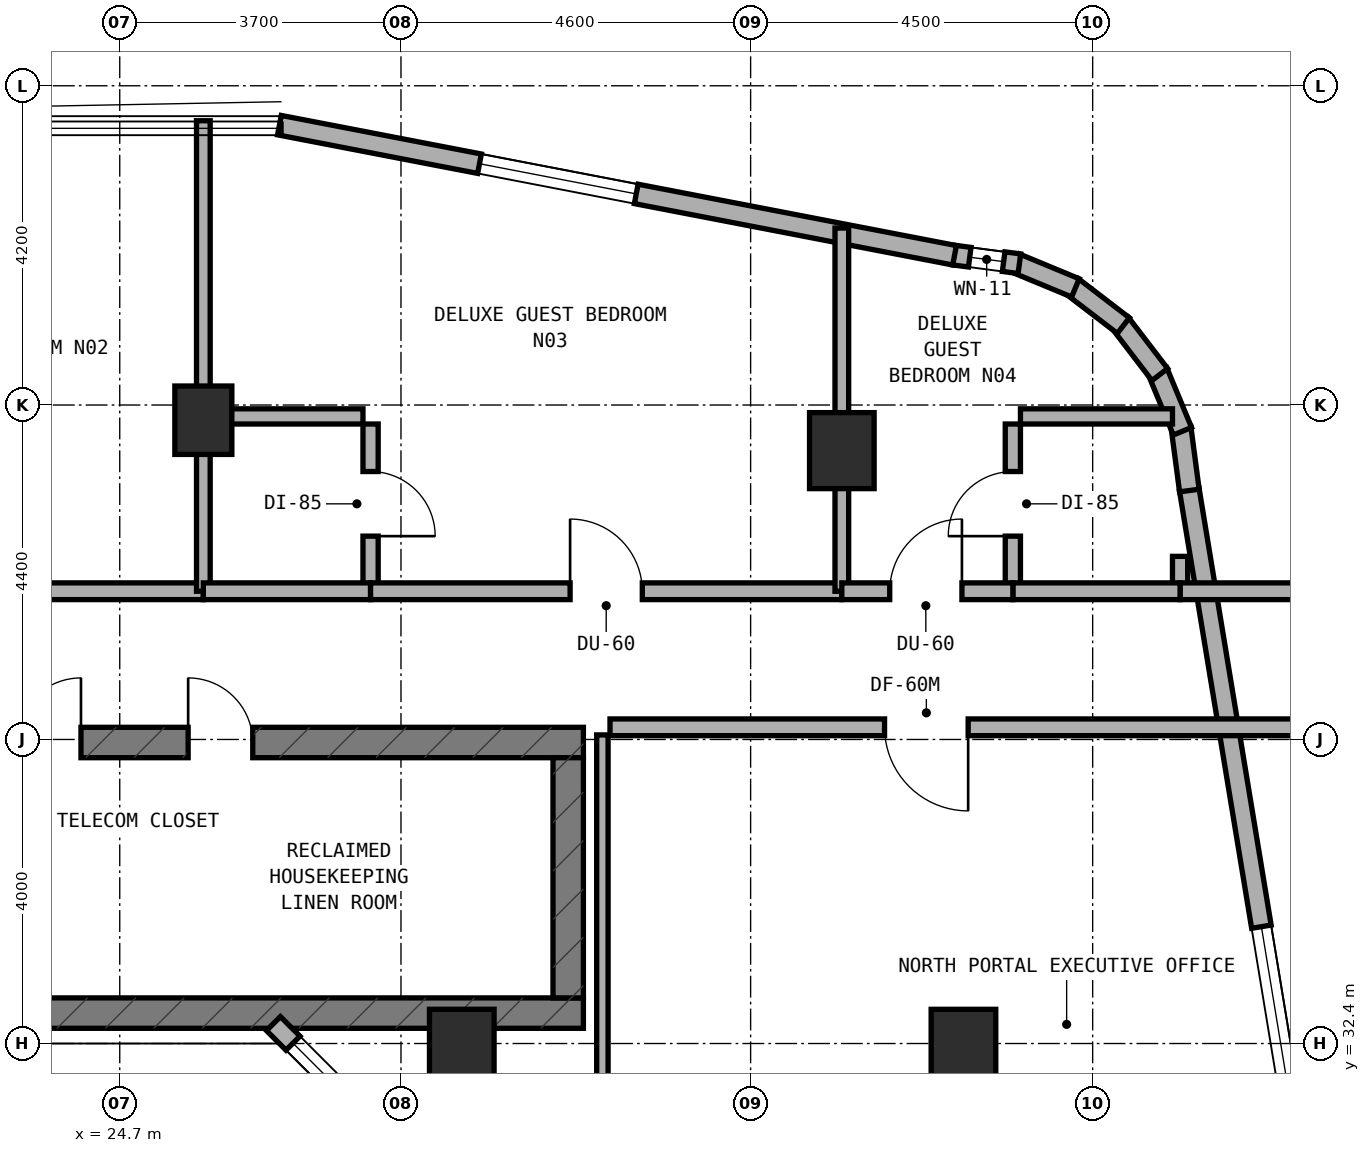
"""IFC4 building model, lengths in metres.
Left out: names, types, materials, properties, quantities, classifications, styles, units other than length and angle.
Written with IfcOpenShell. Run it as: python <this file> out.ifc"""

import sys

from ifc_helpers import new_model, si_unit, direction, frame, frame_2d, origin, origin_2d, place, context, subcontext, project, spatial, rectangle, extrude, element, fill, save


model = new_model("IFC4")
c1 = context("Model", 3, precision=1e-05, world=origin(), true_north=direction((0.0, 1.0)))
c2 = subcontext(c1, "Body", "Model", "MODEL_VIEW")
j1 = project(units=[si_unit("LENGTHUNIT", "METRE"), si_unit("PLANEANGLEUNIT", "RADIAN")], contexts=[c1])
p1 = place(None, origin())
s1 = spatial("IfcSite", under=j1, at=p1, CompositionType="ELEMENT")
p2 = place(p1, origin())
s2 = spatial("IfcBuilding", under=s1, at=p2, CompositionType="ELEMENT")
p3 = place(p2, frame((0.0, 0.0, 177.5)))
s3 = spatial("IfcBuildingStorey", under=s2, at=p3, CompositionType="ELEMENT", Elevation=177.5)
p4 = place(p3, frame((6.4, 32.8, 0.0), z_axis=(0.0, 0.0, 1.0), x_axis=(1.0, 0.0, 0.0)))
e1 = element("IfcWall", 1, at=p4, inside=s3, PredefinedType="SHEAR", context=c2, shape_type="SweptSolid", body=[
    extrude(rectangle(XDim=24.4, YDim=0.4, at=frame_2d((12.2, 0.0))), origin(), (0.0, 0.0, 1.0), 3.6),
])
p5 = place(p4, frame((6.05, 0.0, 0.0)))
e2 = element("IfcOpeningElement", 2, at=p5, cuts=e1, PredefinedType="OPENING", context=c2, shape_type="SweptSolid", body=[
    extrude(rectangle(XDim=1.1, YDim=2.15, at=frame_2d((0.55, 1.075))), frame((0.0, 0.21, 0.0), z_axis=(0.0, -1.0, 0.0), x_axis=(1.0, 0.0, 0.0)), (0.0, 0.0, 1.0), 0.42),
])
p6 = place(p3, frame((6.4, 36.36, 0.0), z_axis=(0.0, 0.0, 1.0), x_axis=(1.0, 0.0, 0.0)))
e3 = element("IfcWall", 3, at=p6, inside=s3, PredefinedType="SHEAR", context=c2, shape_type="SweptSolid", body=[
    extrude(rectangle(XDim=24.4, YDim=0.4, at=frame_2d((12.2, 0.0))), origin(), (0.0, 0.0, 1.0), 3.6),
])
p7 = place(p6, frame((9.15, 0.0, 0.0)))
e4 = element("IfcOpeningElement", 4, at=p7, cuts=e3, PredefinedType="OPENING", context=c2, shape_type="SweptSolid", body=[
    extrude(rectangle(XDim=1.2, YDim=2.15, at=frame_2d((0.6, 1.075))), frame((0.0, 0.21, 0.0), z_axis=(0.0, -1.0, 0.0), x_axis=(1.0, 0.0, 0.0)), (0.0, 0.0, 1.0), 0.42),
])
p8 = place(p6, frame((19.2, 0.0, 0.0)))
e5 = element("IfcOpeningElement", 5, at=p8, cuts=e3, PredefinedType="OPENING", context=c2, shape_type="SweptSolid", body=[
    extrude(rectangle(XDim=0.85, YDim=2.1, at=frame_2d((0.425, 1.05))), frame((0.0, 0.21, 0.0), z_axis=(0.0, -1.0, 0.0), x_axis=(1.0, 0.0, 0.0)), (0.0, 0.0, 1.0), 0.42),
])
p9 = place(p6, frame((16.94, 0.0, 0.0)))
e6 = element("IfcOpeningElement", 6, at=p9, cuts=e3, PredefinedType="OPENING", context=c2, shape_type="SweptSolid", body=[
    extrude(rectangle(XDim=0.85, YDim=2.1, at=frame_2d((0.425, 1.05))), frame((0.0, 0.21, 0.0), z_axis=(0.0, -1.0, 0.0), x_axis=(1.0, 0.0, 0.0)), (0.0, 0.0, 1.0), 0.42),
])
p10 = place(p3, frame((30.6, 33.0, 0.0), z_axis=(0.0, 0.0, 1.0), x_axis=(0.0, 1.0, 0.0)))
e7 = element("IfcWall", 7, at=p10, inside=s3, PredefinedType="SHEAR", context=c2, shape_type="SweptSolid", body=[
    extrude(rectangle(XDim=3.16, YDim=0.4, at=frame_2d((1.58, 0.0))), origin(), (0.0, 0.0, 1.0), 3.6),
])
p11 = place(p3, frame((25.8, 40.6, 0.0), z_axis=(0.0, 0.0, 1.0), x_axis=(1.0, 0.0, 0.0)))
e8 = element("IfcColumn", 8, at=p11, inside=s3, PredefinedType="COLUMN", context=c2, shape_type="SweptSolid", body=[
    extrude(rectangle(XDim=0.75, YDim=0.9, at=origin_2d()), origin(), (0.0, 0.0, 1.0), 3.6),
])
for number, where, z_axis, x_axis in (
    (9, (34.2, 40.2, 0.0), (0.0, 0.0, 1.0), (1.0, 0.0, 0.0)),
    (10, (35.8, 32.35, 0.0), (0.0, 0.0, 1.0), (1.0, 0.0, 0.0)),
    (11, (29.2, 32.35, 0.0), (0.0, 0.0, 1.0), (1.0, 0.0, 0.0)),
):
    element("IfcColumn", number, at=place(p3, frame(where, z_axis=z_axis, x_axis=x_axis)), inside=s3, PredefinedType="COLUMN", context=c2, shape_type="SweptSolid", body=[
        extrude(rectangle(XDim=0.85, YDim=1.0, at=origin_2d()), origin(), (0.0, 0.0, 1.0), 3.6),
    ])
p12 = place(p3, frame((26.722, 32.662, 0.0), z_axis=(0.0, 0.0, 1.0), x_axis=(0.707106781187, -0.707106781187, 0.0)))
e12 = element("IfcWall", 12, at=p12, inside=s3, PredefinedType="STANDARD", context=c2, shape_type="SweptSolid", body=[
    extrude(rectangle(XDim=2.529, YDim=0.26, at=frame_2d((1.264, 0.0))), origin(), (0.0, 0.0, 1.0), 3.32),
])
p13 = place(p12, frame((0.364, 0.0, 0.85)))
e13 = element("IfcOpeningElement", 13, at=p13, cuts=e12, PredefinedType="OPENING", context=c2, shape_type="SweptSolid", body=[
    extrude(rectangle(XDim=1.8, YDim=1.5, at=frame_2d((0.9, 0.75))), frame((0.0, 0.14, 0.0), z_axis=(0.0, -1.0, 0.0), x_axis=(1.0, 0.0, 0.0)), (0.0, 0.0, 1.0), 0.28),
])
p14 = place(p3, frame((40.476, 29.354, 0.0), z_axis=(0.0, 0.0, 1.0), x_axis=(-0.162811037825, 0.986657268742, 0.0)))
e14 = element("IfcWall", 14, at=p14, inside=s3, PredefinedType="STANDARD", context=c2, shape_type="SweptSolid", body=[
    extrude(rectangle(XDim=10.473, YDim=0.26, at=frame_2d((5.236, 0.0))), origin(), (0.0, 0.0, 1.0), 3.32),
])
p15 = place(p14, frame((2.545, 0.0, 0.85)))
e15 = element("IfcOpeningElement", 15, at=p15, cuts=e14, PredefinedType="OPENING", context=c2, shape_type="SweptSolid", body=[
    extrude(rectangle(XDim=2.1, YDim=1.5, at=frame_2d((1.05, 0.75))), frame((0.0, 0.14, 0.0), z_axis=(0.0, -1.0, 0.0), x_axis=(1.0, 0.0, 0.0)), (0.0, 0.0, 1.0), 0.28),
])
p16 = place(p3, frame((38.772, 39.675, 0.0), z_axis=(0.0, 0.0, 1.0), x_axis=(-0.130704676564, 0.99142134712, 0.0)))
e16 = element("IfcWall", 16, at=p16, inside=s3, PredefinedType="STANDARD", context=c2, shape_type="SweptSolid", body=[
    extrude(rectangle(XDim=0.833, YDim=0.26, at=frame_2d((0.417, 0.0))), origin(), (0.0, 0.0, 1.0), 3.32),
])
p17 = place(p3, frame((38.681, 40.455, 0.0), z_axis=(0.0, 0.0, 1.0), x_axis=(-0.383086687796, 0.923712395518, 0.0)))
e17 = element("IfcWall", 17, at=p17, inside=s3, PredefinedType="STANDARD", context=c2, shape_type="SweptSolid", body=[
    extrude(rectangle(XDim=0.851, YDim=0.26, at=frame_2d((0.425, 0.0))), origin(), (0.0, 0.0, 1.0), 3.32),
])
for number, where, z_axis, x_axis in (
    (18, (38.383, 41.201, 0.0), (0.0, 0.0, 1.0), (-0.608, 0.794, 0.0)),
    (19, (37.904, 41.845, 0.0), (0.0, 0.0, 1.0), (-0.794, 0.608, 0.0)),
):
    element("IfcWall", number, at=place(p3, frame(where, z_axis=z_axis, x_axis=x_axis)), inside=s3, PredefinedType="STANDARD", context=c2, shape_type="SweptSolid", body=[
        extrude(rectangle(XDim=0.85, YDim=0.26, at=frame_2d((0.425, 0.0))), origin(), (0.0, 0.0, 1.0), 3.32),
    ])
p18 = place(p3, frame((37.273, 42.341, 0.0), z_axis=(0.0, 0.0, 1.0), x_axis=(-0.923712395518, 0.383086687796, 0.0)))
e20 = element("IfcWall", 20, at=p18, inside=s3, PredefinedType="STANDARD", context=c2, shape_type="SweptSolid", body=[
    extrude(rectangle(XDim=0.851, YDim=0.26, at=frame_2d((0.425, 0.0))), origin(), (0.0, 0.0, 1.0), 3.32),
])
p19 = place(p3, frame((36.536, 42.659, 0.0), z_axis=(0.0, 0.0, 1.0), x_axis=(-0.991488716273, 0.130192647656, 0.0)))
e21 = element("IfcWall", 21, at=p19, inside=s3, PredefinedType="STANDARD", context=c2, shape_type="SweptSolid", body=[
    extrude(rectangle(XDim=0.868, YDim=0.26, at=frame_2d((0.434, 0.0))), origin(), (0.0, 0.0, 1.0), 3.32),
])
p20 = place(p19, frame((0.209, 0.0, 0.85)))
e22 = element("IfcOpeningElement", 22, at=p20, cuts=e21, PredefinedType="OPENING", context=c2, shape_type="SweptSolid", body=[
    extrude(rectangle(XDim=0.45, YDim=1.5, at=frame_2d((0.225, 0.75))), frame((0.0, 0.14, 0.0), z_axis=(0.0, -1.0, 0.0), x_axis=(1.0, 0.0, 0.0)), (0.0, 0.0, 1.0), 0.28),
])
p21 = place(p3, frame((35.683, 42.77, 0.0), z_axis=(0.0, 0.0, 1.0), x_axis=(-0.98192801022, 0.189254809039, 0.0)))
e23 = element("IfcWall", 23, at=p21, inside=s3, PredefinedType="STANDARD", context=c2, shape_type="SweptSolid", body=[
    extrude(rectangle(XDim=9.046, YDim=0.26, at=frame_2d((4.523, 0.0))), origin(), (0.0, 0.0, 1.0), 3.32),
])
p22 = place(p21, frame((4.265, 0.0, 0.85)))
e24 = element("IfcOpeningElement", 24, at=p22, cuts=e23, PredefinedType="OPENING", context=c2, shape_type="SweptSolid", body=[
    extrude(rectangle(XDim=2.1, YDim=1.5, at=frame_2d((1.05, 0.75))), frame((0.0, 0.14, 0.0), z_axis=(0.0, -1.0, 0.0), x_axis=(1.0, 0.0, 0.0)), (0.0, 0.0, 1.0), 0.28),
])
p23 = place(p3, frame((14.2, 38.35, 0.0), z_axis=(0.0, 0.0, 1.0), x_axis=(1.0, 0.0, 0.0)))
e25 = element("IfcWall", 25, at=p23, inside=s3, PredefinedType="SOLIDWALL", context=c2, shape_type="SweptSolid", body=[
    extrude(rectangle(XDim=11.6, YDim=0.22, at=frame_2d((5.8, 0.0))), origin(), (0.0, 0.0, 1.0), 2.995),
])
p24 = place(p23, frame((5.325, 0.0, 0.0)))
e26 = element("IfcOpeningElement", 26, at=p24, cuts=e25, PredefinedType="OPENING", context=c2, shape_type="SweptSolid", body=[
    extrude(rectangle(XDim=0.95, YDim=2.1, at=frame_2d((0.475, 1.05))), frame((0.0, 0.12, 0.0), z_axis=(0.0, -1.0, 0.0), x_axis=(1.0, 0.0, 0.0)), (0.0, 0.0, 1.0), 0.24),
])
p25 = place(p3, frame((25.8, 38.35, 0.0), z_axis=(0.0, 0.0, 1.0), x_axis=(0.0, 1.0, 0.0)))
e27 = element("IfcWall", 27, at=p25, inside=s3, PredefinedType="SOLIDWALL", context=c2, shape_type="SweptSolid", body=[
    extrude(rectangle(XDim=6.19, YDim=0.18, at=frame_2d((3.095, 0.0))), origin(), (0.0, 0.0, 1.0), 2.935),
])
p26 = place(p3, frame((28.0, 38.45, 0.0), z_axis=(0.0, 0.0, 1.0), x_axis=(0.0, 1.0, 0.0)))
e28 = element("IfcWall", 28, at=p26, inside=s3, PredefinedType="PLUMBINGWALL", context=c2, shape_type="SweptSolid", body=[
    extrude(rectangle(XDim=2.1, YDim=0.2, at=frame_2d((1.05, 0.0))), origin(), (0.0, 0.0, 1.0), 2.845),
])
p27 = place(p26, frame((0.625, 0.0, 0.0)))
e29 = element("IfcOpeningElement", 29, at=p27, cuts=e28, PredefinedType="OPENING", context=c2, shape_type="SweptSolid", body=[
    extrude(rectangle(XDim=0.85, YDim=2.1, at=frame_2d((0.425, 1.05))), frame((0.0, 0.11, 0.0), z_axis=(0.0, -1.0, 0.0), x_axis=(1.0, 0.0, 0.0)), (0.0, 0.0, 1.0), 0.22),
])
p28 = place(p3, frame((25.9, 40.65, 0.0), z_axis=(0.0, 0.0, 1.0), x_axis=(1.0, 0.0, 0.0)))
e30 = element("IfcWall", 30, at=p28, inside=s3, PredefinedType="PLUMBINGWALL", context=c2, shape_type="SweptSolid", body=[
    extrude(rectangle(XDim=2.0, YDim=0.2, at=frame_2d((1.0, 0.0))), origin(), (0.0, 0.0, 1.0), 2.935),
])
p29 = place(p3, frame((25.8, 38.35, 0.0), z_axis=(0.0, 0.0, 1.0), x_axis=(1.0, 0.0, 0.0)))
e31 = element("IfcWall", 31, at=p29, inside=s3, PredefinedType="SOLIDWALL", context=c2, shape_type="SweptSolid", body=[
    extrude(rectangle(XDim=2.2, YDim=0.22, at=frame_2d((1.1, 0.0))), origin(), (0.0, 0.0, 1.0), 2.995),
])
p30 = place(p3, frame((28.0, 38.35, 0.0), z_axis=(0.0, 0.0, 1.0), x_axis=(1.0, 0.0, 0.0)))
e32 = element("IfcWall", 32, at=p30, inside=s3, PredefinedType="SOLIDWALL", context=c2, shape_type="SweptSolid", body=[
    extrude(rectangle(XDim=6.2, YDim=0.22, at=frame_2d((3.1, 0.0))), origin(), (0.0, 0.0, 1.0), 2.995),
])
p31 = place(p30, frame((2.625, 0.0, 0.0)))
e33 = element("IfcOpeningElement", 33, at=p31, cuts=e32, PredefinedType="OPENING", context=c2, shape_type="SweptSolid", body=[
    extrude(rectangle(XDim=0.95, YDim=2.1, at=frame_2d((0.475, 1.05))), frame((0.0, 0.12, 0.0), z_axis=(0.0, -1.0, 0.0), x_axis=(1.0, 0.0, 0.0)), (0.0, 0.0, 1.0), 0.24),
])
p32 = place(p3, frame((34.2, 38.35, 0.0), z_axis=(0.0, 0.0, 1.0), x_axis=(0.0, 1.0, 0.0)))
e34 = element("IfcWall", 34, at=p32, inside=s3, PredefinedType="SOLIDWALL", context=c2, shape_type="SweptSolid", body=[
    extrude(rectangle(XDim=4.778, YDim=0.18, at=frame_2d((2.389, 0.0))), origin(), (0.0, 0.0, 1.0), 2.935),
])
p33 = place(p3, frame((36.45, 38.45, 0.0), z_axis=(0.0, 0.0, 1.0), x_axis=(0.0, 1.0, 0.0)))
e35 = element("IfcWall", 35, at=p33, inside=s3, PredefinedType="PLUMBINGWALL", context=c2, shape_type="SweptSolid", body=[
    extrude(rectangle(XDim=2.1, YDim=0.2, at=frame_2d((1.05, 0.0))), origin(), (0.0, 0.0, 1.0), 3.32),
])
p34 = place(p33, frame((0.625, 0.0, 0.0)))
e36 = element("IfcOpeningElement", 36, at=p34, cuts=e35, PredefinedType="OPENING", context=c2, shape_type="SweptSolid", body=[
    extrude(rectangle(XDim=0.85, YDim=2.1, at=frame_2d((0.425, 1.05))), frame((0.0, 0.11, 0.0), z_axis=(0.0, -1.0, 0.0), x_axis=(1.0, 0.0, 0.0)), (0.0, 0.0, 1.0), 0.22),
])
p35 = place(p3, frame((36.55, 40.65, 0.0), z_axis=(0.0, 0.0, 1.0), x_axis=(1.0, 0.0, 0.0)))
e37 = element("IfcWall", 37, at=p35, inside=s3, PredefinedType="PLUMBINGWALL", context=c2, shape_type="SweptSolid", body=[
    extrude(rectangle(XDim=2.0, YDim=0.2, at=frame_2d((1.0, 0.0))), origin(), (0.0, 0.0, 1.0), 3.32),
])
p36 = place(p3, frame((38.65, 38.35, 0.0), z_axis=(0.0, 0.0, 1.0), x_axis=(0.0, 1.0, 0.0)))
e38 = element("IfcWall", 38, at=p36, inside=s3, PredefinedType="PLUMBINGWALL", context=c2, shape_type="SweptSolid", body=[
    extrude(rectangle(XDim=0.459, YDim=0.2, at=frame_2d((0.229, 0.0))), origin(), (0.0, 0.0, 1.0), 3.32),
])
p37 = place(p3, frame((38.65, 38.35, 0.0), z_axis=(0.0, 0.0, 1.0), x_axis=(1.0, 0.0, 0.0)))
e39 = element("IfcWall", 39, at=p37, inside=s3, PredefinedType="SOLIDWALL", context=c2, shape_type="SweptSolid", body=[
    extrude(rectangle(XDim=1.79, YDim=0.22, at=frame_2d((0.895, 0.0))), origin(), (0.0, 0.0, 1.0), 3.32),
])
p38 = place(p3, frame((36.45, 38.35, 0.0), z_axis=(0.0, 0.0, 1.0), x_axis=(1.0, 0.0, 0.0)))
e40 = element("IfcWall", 40, at=p38, inside=s3, PredefinedType="SOLIDWALL", context=c2, shape_type="SweptSolid", body=[
    extrude(rectangle(XDim=2.2, YDim=0.22, at=frame_2d((1.1, 0.0))), origin(), (0.0, 0.0, 1.0), 3.32),
])
p39 = place(p3, frame((34.2, 38.35, 0.0), z_axis=(0.0, 0.0, 1.0), x_axis=(1.0, 0.0, 0.0)))
e41 = element("IfcWall", 41, at=p39, inside=s3, PredefinedType="SOLIDWALL", context=c2, shape_type="SweptSolid", body=[
    extrude(rectangle(XDim=2.25, YDim=0.22, at=frame_2d((1.125, 0.0))), origin(), (0.0, 0.0, 1.0), 2.935),
])
p40 = place(p39, frame((0.63, 0.0, 0.0)))
e42 = element("IfcOpeningElement", 42, at=p40, cuts=e41, PredefinedType="OPENING", context=c2, shape_type="SweptSolid", body=[
    extrude(rectangle(XDim=0.95, YDim=2.1, at=frame_2d((0.475, 1.05))), frame((0.0, 0.12, 0.0), z_axis=(0.0, -1.0, 0.0), x_axis=(1.0, 0.0, 0.0)), (0.0, 0.0, 1.0), 0.24),
])
p41 = place(p3, frame((31.05, 29.8, 0.0), z_axis=(0.0, 0.0, 1.0), x_axis=(0.0, 1.0, 0.0)))
e43 = element("IfcWall", 43, at=p41, inside=s3, PredefinedType="PARTITIONING", context=c2, shape_type="SweptSolid", body=[
    extrude(rectangle(XDim=6.66, YDim=0.15, at=frame_2d((3.33, 0.0))), origin(), (0.0, 0.0, 1.0), 2.995),
])
p42 = place(p3, frame((31.15, 36.56, 0.0), z_axis=(0.0, 0.0, 1.0), x_axis=(1.0, 0.0, 0.0)))
e44 = element("IfcWall", 44, at=p42, inside=s3, PredefinedType="SOLIDWALL", context=c2, shape_type="SweptSolid", body=[
    extrude(rectangle(XDim=9.15, YDim=0.22, at=frame_2d((4.575, 0.0))), origin(), (0.0, 0.0, 1.0), 2.935),
])
p43 = place(p42, frame((3.612, 0.0, 0.0)))
e45 = element("IfcOpeningElement", 45, at=p43, cuts=e44, PredefinedType="OPENING", context=c2, shape_type="SweptSolid", body=[
    extrude(rectangle(XDim=1.1, YDim=2.1, at=frame_2d((0.55, 1.05))), frame((0.0, 0.12, 0.0), z_axis=(0.0, -1.0, 0.0), x_axis=(1.0, 0.0, 0.0)), (0.0, 0.0, 1.0), 0.24),
])
p44 = place(p13, origin())
e46 = element("IfcWindow", 46, at=p44, inside=s3, PartitioningType="SINGLE_PANEL", PredefinedType="WINDOW", context=c2, shape_type="SweptSolid", body=[
    extrude(rectangle(XDim=1.8, YDim=1.5, at=frame_2d((0.9, 0.75))), frame((0.0, 0.03, 0.0), z_axis=(0.0, -1.0, 0.0), x_axis=(1.0, 0.0, 0.0)), (0.0, 0.0, 1.0), 0.06),
])
fill(e13, e46)
p45 = place(p15, origin())
e47 = element("IfcWindow", 47, at=p45, inside=s3, PartitioningType="SINGLE_PANEL", PredefinedType="WINDOW", context=c2, shape_type="SweptSolid", body=[
    extrude(rectangle(XDim=2.1, YDim=1.5, at=frame_2d((1.05, 0.75))), frame((0.0, 0.03, 0.0), z_axis=(0.0, -1.0, 0.0), x_axis=(1.0, 0.0, 0.0)), (0.0, 0.0, 1.0), 0.06),
])
fill(e15, e47)
p46 = place(p22, origin())
e48 = element("IfcWindow", 48, at=p46, inside=s3, PartitioningType="SINGLE_PANEL", PredefinedType="WINDOW", context=c2, shape_type="SweptSolid", body=[
    extrude(rectangle(XDim=2.1, YDim=1.5, at=frame_2d((1.05, 0.75))), frame((0.0, 0.03, 0.0), z_axis=(0.0, -1.0, 0.0), x_axis=(1.0, 0.0, 0.0)), (0.0, 0.0, 1.0), 0.06),
])
fill(e24, e48)
p47 = place(p20, origin())
e49 = element("IfcWindow", 49, at=p47, inside=s3, PartitioningType="SINGLE_PANEL", PredefinedType="WINDOW", context=c2, shape_type="SweptSolid", body=[
    extrude(rectangle(XDim=0.45, YDim=1.5, at=frame_2d((0.225, 0.75))), frame((0.0, 0.03, 0.0), z_axis=(0.0, -1.0, 0.0), x_axis=(1.0, 0.0, 0.0)), (0.0, 0.0, 1.0), 0.06),
])
fill(e22, e49)
p48 = place(p8, origin())
e50 = element("IfcDoor", 50, at=p48, inside=s3, OperationType="SINGLE_SWING_LEFT", PredefinedType="DOOR", context=c2, shape_type="SweptSolid", body=[
    extrude(rectangle(XDim=0.85, YDim=2.1, at=frame_2d((0.425, 1.05))), frame((0.0, 0.025, 0.0), z_axis=(0.0, -1.0, 0.0), x_axis=(1.0, 0.0, 0.0)), (0.0, 0.0, 1.0), 0.05),
])
fill(e5, e50)
p49 = place(p9, origin())
e51 = element("IfcDoor", 51, at=p49, inside=s3, OperationType="SINGLE_SWING_RIGHT", PredefinedType="DOOR", context=c2, shape_type="SweptSolid", body=[
    extrude(rectangle(XDim=0.85, YDim=2.1, at=frame_2d((0.425, 1.05))), frame((0.0, 0.025, 0.0), z_axis=(0.0, -1.0, 0.0), x_axis=(1.0, 0.0, 0.0)), (0.0, 0.0, 1.0), 0.05),
])
fill(e6, e51)
p50 = place(p27, frame((0.85, 0.0, 0.0), z_axis=(0.0, 0.0, 1.0), x_axis=(-1.0, 0.0, 0.0)))
e52 = element("IfcDoor", 52, at=p50, inside=s3, OperationType="SINGLE_SWING_RIGHT", PredefinedType="DOOR", context=c2, shape_type="SweptSolid", body=[
    extrude(rectangle(XDim=0.85, YDim=2.1, at=frame_2d((0.425, 1.05))), frame((0.0, 0.025, 0.0), z_axis=(0.0, -1.0, 0.0), x_axis=(1.0, 0.0, 0.0)), (0.0, 0.0, 1.0), 0.05),
])
fill(e29, e52)
p51 = place(p31, origin())
e53 = element("IfcDoor", 53, at=p51, inside=s3, OperationType="SINGLE_SWING_LEFT", PredefinedType="DOOR", context=c2, shape_type="SweptSolid", body=[
    extrude(rectangle(XDim=0.95, YDim=2.1, at=frame_2d((0.475, 1.05))), frame((0.0, 0.025, 0.0), z_axis=(0.0, -1.0, 0.0), x_axis=(1.0, 0.0, 0.0)), (0.0, 0.0, 1.0), 0.05),
])
fill(e33, e53)
p52 = place(p34, origin())
e54 = element("IfcDoor", 54, at=p52, inside=s3, OperationType="SINGLE_SWING_LEFT", PredefinedType="DOOR", context=c2, shape_type="SweptSolid", body=[
    extrude(rectangle(XDim=0.85, YDim=2.1, at=frame_2d((0.425, 1.05))), frame((0.0, 0.025, 0.0), z_axis=(0.0, -1.0, 0.0), x_axis=(1.0, 0.0, 0.0)), (0.0, 0.0, 1.0), 0.05),
])
fill(e36, e54)
p53 = place(p40, origin())
e55 = element("IfcDoor", 55, at=p53, inside=s3, OperationType="SINGLE_SWING_RIGHT", PredefinedType="DOOR", context=c2, shape_type="SweptSolid", body=[
    extrude(rectangle(XDim=0.95, YDim=2.1, at=frame_2d((0.475, 1.05))), frame((0.0, 0.025, 0.0), z_axis=(0.0, -1.0, 0.0), x_axis=(1.0, 0.0, 0.0)), (0.0, 0.0, 1.0), 0.05),
])
fill(e42, e55)
p54 = place(p43, frame((1.1, 0.0, 0.0), z_axis=(0.0, 0.0, 1.0), x_axis=(-1.0, 0.0, 0.0)))
e56 = element("IfcDoor", 56, at=p54, inside=s3, OperationType="SINGLE_SWING_LEFT", PredefinedType="DOOR", context=c2, shape_type="SweptSolid", body=[
    extrude(rectangle(XDim=1.1, YDim=2.1, at=frame_2d((0.55, 1.05))), frame((0.0, 0.025, 0.0), z_axis=(0.0, -1.0, 0.0), x_axis=(1.0, 0.0, 0.0)), (0.0, 0.0, 1.0), 0.05),
])
fill(e45, e56)
save(model, sys.argv[1])
